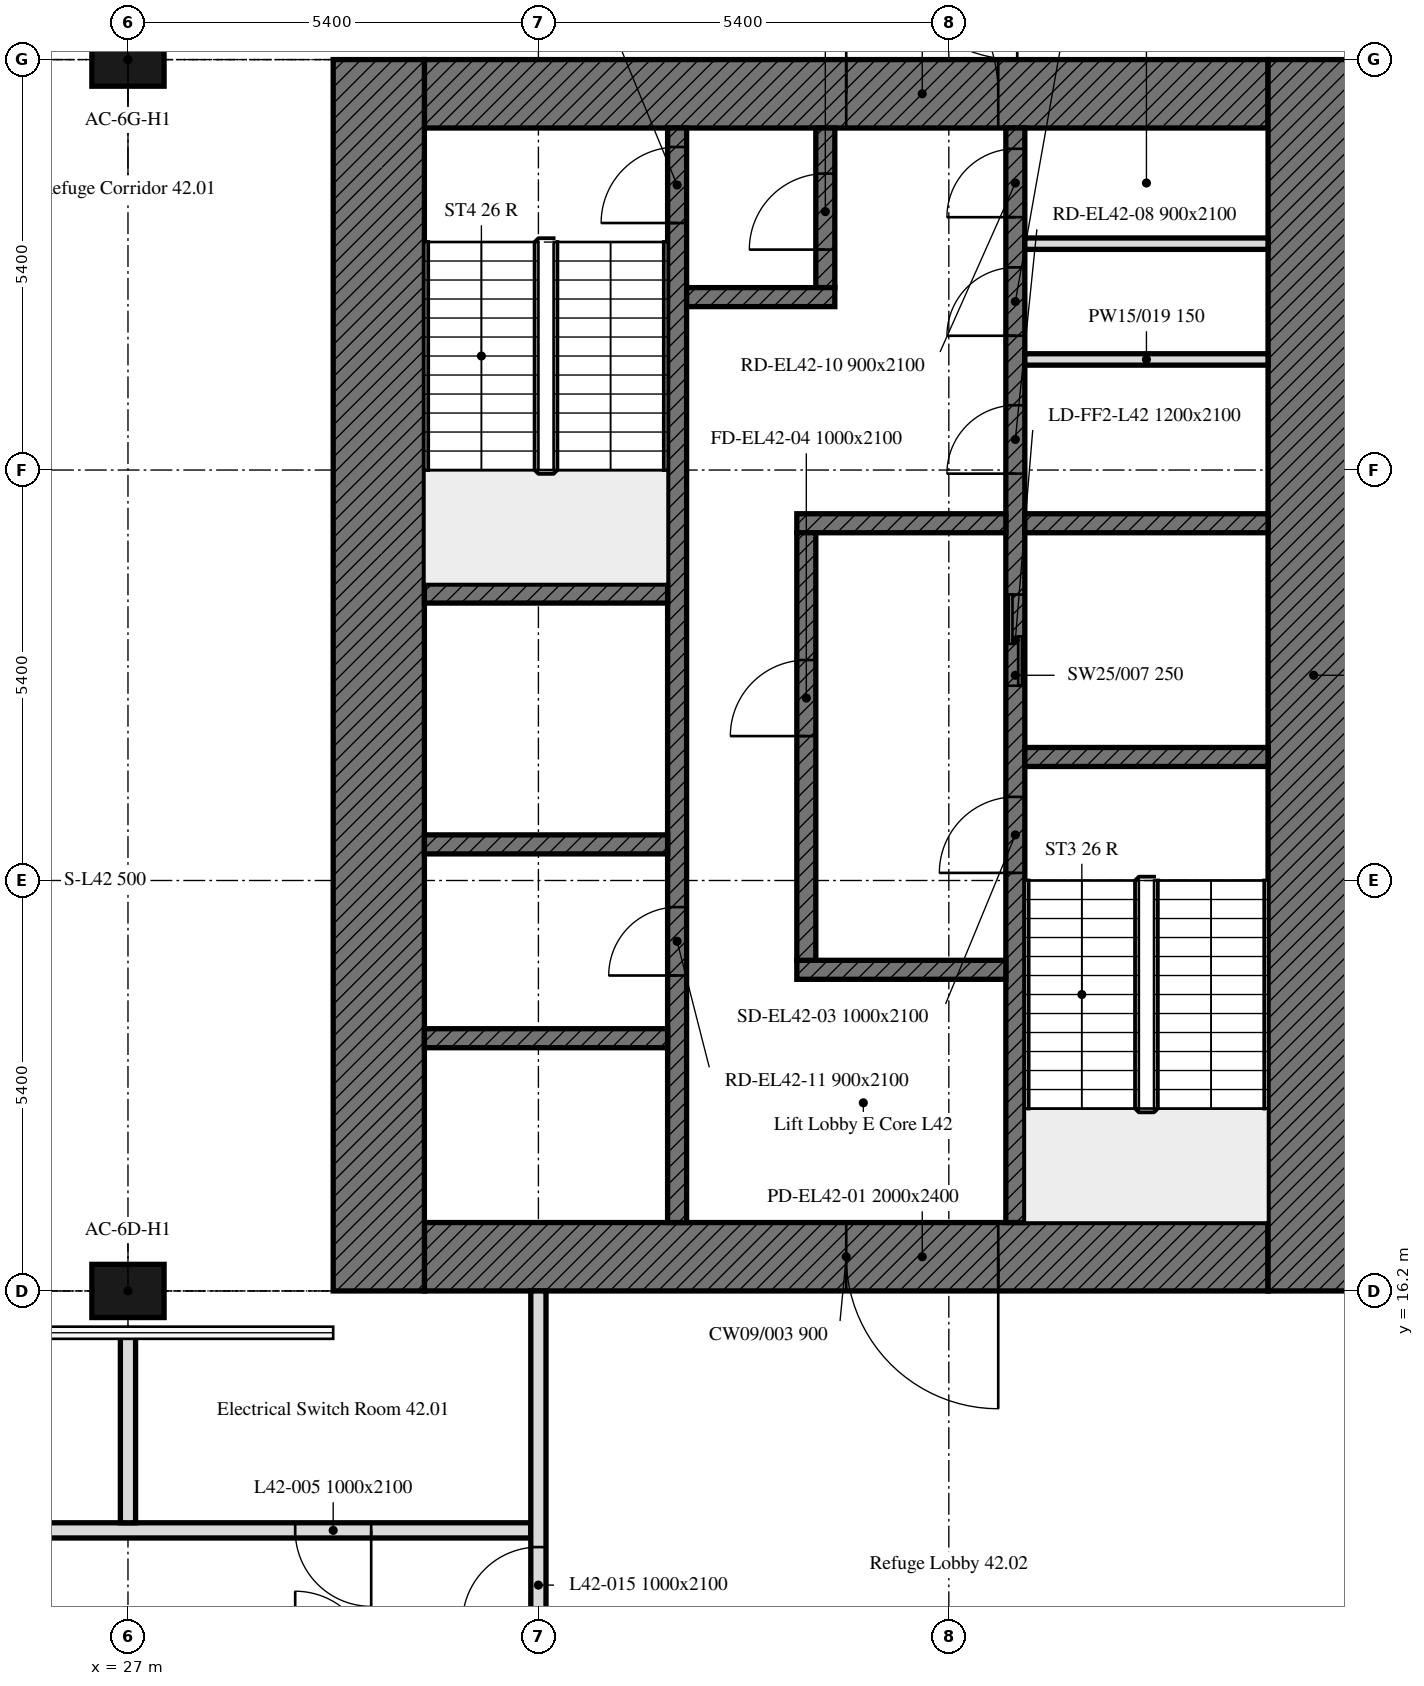
"""IFC4 building model, lengths in metres.
Left out: names, types, materials, properties, quantities, classifications, styles, units other than length and angle.
Written with IfcOpenShell. Run it as: python <this file> out.ifc"""

import sys

from ifc_helpers import new_model, si_unit, direction, frame, frame_2d, origin, origin_2d, place, context, subcontext, project, spatial, rectangle, extrude, element, fill, save


model = new_model("IFC4")
c1 = context("Model", 3, precision=1e-05, world=origin(), true_north=direction((0.0, 1.0)))
c2 = subcontext(c1, "Body", "Model", "MODEL_VIEW")
j1 = project(units=[si_unit("LENGTHUNIT", "METRE"), si_unit("PLANEANGLEUNIT", "RADIAN")], contexts=[c1])
p1 = place(None, origin())
s1 = spatial("IfcSite", under=j1, at=p1, CompositionType="ELEMENT")
p2 = place(p1, origin())
s2 = spatial("IfcBuilding", under=s1, at=p2, CompositionType="ELEMENT")
p3 = place(p2, frame((0.0, 0.0, 175.9)))
s3 = spatial("IfcBuildingStorey", under=s2, at=p3, CompositionType="ELEMENT", Elevation=175.9)
for number, where, z_axis, x_axis in (
    (1, (27.0, 16.2, 0.0), (0.0, 0.0, 1.0), (1.0, 0.0, 0.0)),
    (2, (27.0, 32.4, 0.0), (0.0, 0.0, 1.0), (1.0, 0.0, 0.0)),
):
    element("IfcColumn", number, at=place(p3, frame(where, z_axis=z_axis, x_axis=x_axis)), inside=s3, PredefinedType="COLUMN", context=c2, shape_type="SweptSolid", body=[
        extrude(rectangle(XDim=0.95, YDim=0.7, at=origin_2d()), origin(), (0.0, 0.0, 1.0), 4.5),
    ])
p4 = place(p3, frame((42.0, 16.65, 0.0), z_axis=(0.0, 0.0, 1.0), x_axis=(-1.0, 0.0, 0.0)))
e3 = element("IfcWall", 3, at=p4, inside=s3, PredefinedType="SOLIDWALL", context=c2, shape_type="SweptSolid", body=[
    extrude(rectangle(XDim=11.1, YDim=0.9, at=frame_2d((5.55, 0.0))), origin(), (0.0, 0.0, 1.0), 4.5),
])
p5 = place(p4, frame((3.55, 0.0, 0.0)))
e4 = element("IfcOpeningElement", 4, at=p5, cuts=e3, PredefinedType="OPENING", context=c2, shape_type="SweptSolid", body=[
    extrude(rectangle(XDim=2.0, YDim=2.4, at=frame_2d((1.0, 1.2))), frame((0.0, 0.45, 0.0), z_axis=(0.0, -1.0, 0.0), x_axis=(1.0, 0.0, 0.0)), (0.0, 0.0, 1.0), 0.9),
])
p6 = place(p3, frame((30.9, 31.95, 0.0), z_axis=(0.0, 0.0, 1.0), x_axis=(1.0, 0.0, 0.0)))
e5 = element("IfcWall", 5, at=p6, inside=s3, PredefinedType="SOLIDWALL", context=c2, shape_type="SweptSolid", body=[
    extrude(rectangle(XDim=11.1, YDim=0.9, at=frame_2d((5.55, 0.0))), origin(), (0.0, 0.0, 1.0), 4.5),
])
p7 = place(p6, frame((5.55, 0.0, 0.0)))
e6 = element("IfcOpeningElement", 6, at=p7, cuts=e5, PredefinedType="OPENING", context=c2, shape_type="SweptSolid", body=[
    extrude(rectangle(XDim=2.0, YDim=2.4, at=frame_2d((1.0, 1.2))), frame((0.0, 0.45, 0.0), z_axis=(0.0, -1.0, 0.0), x_axis=(1.0, 0.0, 0.0)), (0.0, 0.0, 1.0), 0.9),
])
for number, where, z_axis, x_axis in (
    (7, (42.6, 32.4, 0.0), (0.0, 0.0, 1.0), (0.0, -1.0, 0.0)),
    (8, (30.3, 16.2, 0.0), (0.0, 0.0, 1.0), (0.0, 1.0, 0.0)),
):
    element("IfcWall", number, at=place(p3, frame(where, z_axis=z_axis, x_axis=x_axis)), inside=s3, PredefinedType="SOLIDWALL", context=c2, shape_type="SweptSolid", body=[
        extrude(rectangle(XDim=16.2, YDim=1.2, at=frame_2d((8.1, 0.0))), origin(), (0.0, 0.0, 1.0), 4.5),
    ])
p8 = place(p3, frame((38.675, 17.1, 0.0), z_axis=(0.0, 0.0, 1.0), x_axis=(0.0, 1.0, 0.0)))
e9 = element("IfcWall", 9, at=p8, inside=s3, PredefinedType="SOLIDWALL", context=c2, shape_type="SweptSolid", body=[
    extrude(rectangle(XDim=14.4, YDim=0.25, at=frame_2d((7.2, 0.0))), origin(), (0.0, 0.0, 1.0), 4.5),
])
p9 = place(p8, frame((4.6, 0.0, 0.0)))
e10 = element("IfcOpeningElement", 10, at=p9, cuts=e9, PredefinedType="OPENING", context=c2, shape_type="SweptSolid", body=[
    extrude(rectangle(XDim=1.0, YDim=2.1, at=frame_2d((0.5, 1.05))), frame((0.0, 0.125, 0.0), z_axis=(0.0, -1.0, 0.0), x_axis=(1.0, 0.0, 0.0)), (0.0, 0.0, 1.0), 0.25),
])
p10 = place(p8, frame((7.062, 0.0, 0.0)))
e11 = element("IfcOpeningElement", 11, at=p10, cuts=e9, PredefinedType="OPENING", context=c2, shape_type="SweptSolid", body=[
    extrude(rectangle(XDim=1.2, YDim=2.1, at=frame_2d((0.6, 1.05))), frame((0.0, 0.125, 0.0), z_axis=(0.0, -1.0, 0.0), x_axis=(1.0, 0.0, 0.0)), (0.0, 0.0, 1.0), 0.25),
])
p11 = place(p8, frame((9.853, 0.0, 0.0)))
e12 = element("IfcOpeningElement", 12, at=p11, cuts=e9, PredefinedType="OPENING", context=c2, shape_type="SweptSolid", body=[
    extrude(rectangle(XDim=0.9, YDim=2.1, at=frame_2d((0.45, 1.05))), frame((0.0, 0.125, 0.0), z_axis=(0.0, -1.0, 0.0), x_axis=(1.0, 0.0, 0.0)), (0.0, 0.0, 1.0), 0.25),
])
p12 = place(p8, frame((11.667, 0.0, 0.0)))
e13 = element("IfcOpeningElement", 13, at=p12, cuts=e9, PredefinedType="OPENING", context=c2, shape_type="SweptSolid", body=[
    extrude(rectangle(XDim=0.9, YDim=2.1, at=frame_2d((0.45, 1.05))), frame((0.0, 0.125, 0.0), z_axis=(0.0, -1.0, 0.0), x_axis=(1.0, 0.0, 0.0)), (0.0, 0.0, 1.0), 0.25),
])
p13 = place(p8, frame((13.227, 0.0, 0.0)))
e14 = element("IfcOpeningElement", 14, at=p13, cuts=e9, PredefinedType="OPENING", context=c2, shape_type="SweptSolid", body=[
    extrude(rectangle(XDim=0.9, YDim=2.1, at=frame_2d((0.45, 1.05))), frame((0.0, 0.125, 0.0), z_axis=(0.0, -1.0, 0.0), x_axis=(1.0, 0.0, 0.0)), (0.0, 0.0, 1.0), 0.25),
])
p14 = place(p3, frame((34.225, 17.1, 0.0), z_axis=(0.0, 0.0, 1.0), x_axis=(0.0, 1.0, 0.0)))
e15 = element("IfcWall", 15, at=p14, inside=s3, PredefinedType="SOLIDWALL", context=c2, shape_type="SweptSolid", body=[
    extrude(rectangle(XDim=14.4, YDim=0.25, at=frame_2d((7.2, 0.0))), origin(), (0.0, 0.0, 1.0), 4.5),
])
p15 = place(p14, frame((13.15, 0.0, 0.0)))
e16 = element("IfcOpeningElement", 16, at=p15, cuts=e15, PredefinedType="OPENING", context=c2, shape_type="SweptSolid", body=[
    extrude(rectangle(XDim=1.0, YDim=2.1, at=frame_2d((0.5, 1.05))), frame((0.0, 0.125, 0.0), z_axis=(0.0, -1.0, 0.0), x_axis=(1.0, 0.0, 0.0)), (0.0, 0.0, 1.0), 0.25),
])
p16 = place(p14, frame((3.25, 0.0, 0.0)))
e17 = element("IfcOpeningElement", 17, at=p16, cuts=e15, PredefinedType="OPENING", context=c2, shape_type="SweptSolid", body=[
    extrude(rectangle(XDim=0.9, YDim=2.1, at=frame_2d((0.45, 1.05))), frame((0.0, 0.125, 0.0), z_axis=(0.0, -1.0, 0.0), x_axis=(1.0, 0.0, 0.0)), (0.0, 0.0, 1.0), 0.25),
])
p17 = place(p3, frame((38.8, 23.225, 0.0), z_axis=(0.0, 0.0, 1.0), x_axis=(1.0, 0.0, 0.0)))
e18 = element("IfcWall", 18, at=p17, inside=s3, PredefinedType="SOLIDWALL", context=c2, shape_type="SweptSolid", body=[
    extrude(rectangle(XDim=3.2, YDim=0.25, at=frame_2d((1.6, 0.0))), origin(), (0.0, 0.0, 1.0), 4.5),
])
for number, where, z_axis, x_axis in (
    (19, (30.9, 25.375, 0.0), (0.0, 0.0, 1.0), (1.0, 0.0, 0.0)),
    (20, (30.9, 22.075, 0.0), (0.0, 0.0, 1.0), (1.0, 0.0, 0.0)),
):
    element("IfcWall", number, at=place(p3, frame(where, z_axis=z_axis, x_axis=x_axis)), inside=s3, PredefinedType="SOLIDWALL", context=c2, shape_type="SweptSolid", body=[
        extrude(rectangle(XDim=3.2, YDim=0.25, at=frame_2d((1.6, 0.0))), origin(), (0.0, 0.0, 1.0), 4.5),
    ])
p18 = place(p3, frame((38.8, 26.3, 0.0), z_axis=(0.0, 0.0, 1.0), x_axis=(1.0, 0.0, 0.0)))
e21 = element("IfcWall", 21, at=p18, inside=s3, PredefinedType="SOLIDWALL", context=c2, shape_type="SweptSolid", body=[
    extrude(rectangle(XDim=3.2, YDim=0.25, at=frame_2d((1.6, 0.0))), origin(), (0.0, 0.0, 1.0), 4.5),
])
for number, where, z_axis, x_axis in (
    (22, (35.8, 26.3, 0.0), (0.0, 0.0, 1.0), (1.0, 0.0, 0.0)),
    (23, (35.8, 20.425, 0.0), (0.0, 0.0, 1.0), (1.0, 0.0, 0.0)),
):
    element("IfcWall", number, at=place(p3, frame(where, z_axis=z_axis, x_axis=x_axis)), inside=s3, PredefinedType="SOLIDWALL", context=c2, shape_type="SweptSolid", body=[
        extrude(rectangle(XDim=2.75, YDim=0.25, at=frame_2d((1.375, 0.0))), origin(), (0.0, 0.0, 1.0), 4.5),
    ])
p19 = place(p3, frame((36.175, 29.4, 0.0), z_axis=(0.0, 0.0, 1.0), x_axis=(0.0, 1.0, 0.0)))
e24 = element("IfcWall", 24, at=p19, inside=s3, PredefinedType="SOLIDWALL", context=c2, shape_type="SweptSolid", body=[
    extrude(rectangle(XDim=2.1, YDim=0.25, at=frame_2d((1.05, 0.0))), origin(), (0.0, 0.0, 1.0), 4.5),
])
p20 = place(p19, frame((0.5, 0.0, 0.0)))
e25 = element("IfcOpeningElement", 25, at=p20, cuts=e24, PredefinedType="OPENING", context=c2, shape_type="SweptSolid", body=[
    extrude(rectangle(XDim=1.0, YDim=2.1, at=frame_2d((0.5, 1.05))), frame((0.0, 0.125, 0.0), z_axis=(0.0, -1.0, 0.0), x_axis=(1.0, 0.0, 0.0)), (0.0, 0.0, 1.0), 0.25),
])
p21 = place(p3, frame((34.35, 29.275, 0.0), z_axis=(0.0, 0.0, 1.0), x_axis=(1.0, 0.0, 0.0)))
e26 = element("IfcWall", 26, at=p21, inside=s3, PredefinedType="SOLIDWALL", context=c2, shape_type="SweptSolid", body=[
    extrude(rectangle(XDim=1.95, YDim=0.25, at=frame_2d((0.975, 0.0))), origin(), (0.0, 0.0, 1.0), 4.5),
])
p22 = place(p3, frame((35.925, 20.55, 0.0), z_axis=(0.0, 0.0, 1.0), x_axis=(0.0, 1.0, 0.0)))
e27 = element("IfcWall", 27, at=p22, inside=s3, PredefinedType="SOLIDWALL", context=c2, shape_type="SweptSolid", body=[
    extrude(rectangle(XDim=5.625, YDim=0.25, at=frame_2d((2.812, 0.0))), origin(), (0.0, 0.0, 1.0), 4.5),
])
p23 = place(p22, frame((2.95, 0.0, 0.0)))
e28 = element("IfcOpeningElement", 28, at=p23, cuts=e27, PredefinedType="OPENING", context=c2, shape_type="SweptSolid", body=[
    extrude(rectangle(XDim=1.0, YDim=2.1, at=frame_2d((0.5, 1.05))), frame((0.0, 0.125, 0.0), z_axis=(0.0, -1.0, 0.0), x_axis=(1.0, 0.0, 0.0)), (0.0, 0.0, 1.0), 0.25),
])
p24 = place(p3, frame((30.9, 19.525, 0.0), z_axis=(0.0, 0.0, 1.0), x_axis=(1.0, 0.0, 0.0)))
e29 = element("IfcWall", 29, at=p24, inside=s3, PredefinedType="SOLIDWALL", context=c2, shape_type="SweptSolid", body=[
    extrude(rectangle(XDim=3.2, YDim=0.25, at=frame_2d((1.6, 0.0))), origin(), (0.0, 0.0, 1.0), 4.5),
])
for number, where, z_axis, x_axis in (
    (30, (38.8, 28.455, 0.0), (0.0, 0.0, 1.0), (1.0, 0.0, 0.0)),
    (31, (38.8, 29.978, 0.0), (0.0, 0.0, 1.0), (1.0, 0.0, 0.0)),
):
    element("IfcWall", number, at=place(p3, frame(where, z_axis=z_axis, x_axis=x_axis)), inside=s3, PredefinedType="PARTITIONING", context=c2, shape_type="SweptSolid", body=[
        extrude(rectangle(XDim=3.2, YDim=0.15, at=frame_2d((1.6, 0.0))), origin(), (0.0, 0.0, 1.0), 4.5),
    ])
p25 = place(p3, frame((32.3, 13.05, 0.0), z_axis=(0.0, 0.0, 1.0), x_axis=(-1.0, 0.0, 0.0)))
e32 = element("IfcWall", 32, at=p25, inside=s3, PredefinedType="PARTITIONING", context=c2, shape_type="SweptSolid", body=[
    extrude(rectangle(XDim=16.0, YDim=0.2, at=frame_2d((8.0, 0.0))), origin(), (0.0, 0.0, 1.0), 3.9),
])
p26 = place(p25, frame((12.9, 0.0, 0.0)))
e33 = element("IfcOpeningElement", 33, at=p26, cuts=e32, PredefinedType="OPENING", context=c2, shape_type="SweptSolid", body=[
    extrude(rectangle(XDim=1.0, YDim=2.1, at=frame_2d((0.5, 1.05))), frame((0.0, 0.1, 0.0), z_axis=(0.0, -1.0, 0.0), x_axis=(1.0, 0.0, 0.0)), (0.0, 0.0, 1.0), 0.2),
])
p27 = place(p25, frame((7.5, 0.0, 0.0)))
e34 = element("IfcOpeningElement", 34, at=p27, cuts=e32, PredefinedType="OPENING", context=c2, shape_type="SweptSolid", body=[
    extrude(rectangle(XDim=1.0, YDim=2.1, at=frame_2d((0.5, 1.05))), frame((0.0, 0.1, 0.0), z_axis=(0.0, -1.0, 0.0), x_axis=(1.0, 0.0, 0.0)), (0.0, 0.0, 1.0), 0.2),
])
p28 = place(p25, frame((2.1, 0.0, 0.0)))
e35 = element("IfcOpeningElement", 35, at=p28, cuts=e32, PredefinedType="OPENING", context=c2, shape_type="SweptSolid", body=[
    extrude(rectangle(XDim=1.0, YDim=2.1, at=frame_2d((0.5, 1.05))), frame((0.0, 0.1, 0.0), z_axis=(0.0, -1.0, 0.0), x_axis=(1.0, 0.0, 0.0)), (0.0, 0.0, 1.0), 0.2),
])
p29 = place(p3, frame((32.4, 11.326, 0.0), z_axis=(0.0, 0.0, 1.0), x_axis=(0.0, 1.0, 0.0)))
e36 = element("IfcWall", 36, at=p29, inside=s3, PredefinedType="PARTITIONING", context=c2, shape_type="SweptSolid", body=[
    extrude(rectangle(XDim=4.874, YDim=0.2, at=frame_2d((2.437, 0.0))), origin(), (0.0, 0.0, 1.0), 3.9),
])
p30 = place(p29, frame((0.504, 0.0, 0.0)))
e37 = element("IfcOpeningElement", 37, at=p30, cuts=e36, PredefinedType="OPENING", context=c2, shape_type="SweptSolid", body=[
    extrude(rectangle(XDim=1.0, YDim=2.1, at=frame_2d((0.5, 1.05))), frame((0.0, 0.1, 0.0), z_axis=(0.0, -1.0, 0.0), x_axis=(1.0, 0.0, 0.0)), (0.0, 0.0, 1.0), 0.2),
])
p31 = place(p3, frame((27.0, 13.15, 0.0), z_axis=(0.0, 0.0, 1.0), x_axis=(0.0, 1.0, 0.0)))
e38 = element("IfcWall", 38, at=p31, inside=s3, PredefinedType="PARTITIONING", context=c2, shape_type="SweptSolid", body=[
    extrude(rectangle(XDim=2.555, YDim=0.2, at=frame_2d((1.278, 0.0))), origin(), (0.0, 0.0, 1.0), 3.9),
])
p32 = place(p5, origin())
e39 = element("IfcDoor", 39, at=p32, inside=s3, OperationType="DOUBLE_DOOR_SINGLE_SWING", PredefinedType="DOOR", context=c2, shape_type="SweptSolid", body=[
    extrude(rectangle(XDim=2.0, YDim=2.4, at=frame_2d((1.0, 1.2))), frame((0.0, 0.025, 0.0), z_axis=(0.0, -1.0, 0.0), x_axis=(1.0, 0.0, 0.0)), (0.0, 0.0, 1.0), 0.05),
])
fill(e4, e39)
p33 = place(p7, origin())
e40 = element("IfcDoor", 40, at=p33, inside=s3, OperationType="DOUBLE_DOOR_SINGLE_SWING", PredefinedType="DOOR", context=c2, shape_type="SweptSolid", body=[
    extrude(rectangle(XDim=2.0, YDim=2.4, at=frame_2d((1.0, 1.2))), frame((0.0, 0.025, 0.0), z_axis=(0.0, -1.0, 0.0), x_axis=(1.0, 0.0, 0.0)), (0.0, 0.0, 1.0), 0.05),
])
fill(e6, e40)
p34 = place(p9, origin())
e41 = element("IfcDoor", 41, at=p34, inside=s3, OperationType="SINGLE_SWING_LEFT", PredefinedType="DOOR", context=c2, shape_type="SweptSolid", body=[
    extrude(rectangle(XDim=1.0, YDim=2.1, at=frame_2d((0.5, 1.05))), frame((0.0, 0.025, 0.0), z_axis=(0.0, -1.0, 0.0), x_axis=(1.0, 0.0, 0.0)), (0.0, 0.0, 1.0), 0.05),
])
fill(e10, e41)
p35 = place(p23, origin())
e42 = element("IfcDoor", 42, at=p35, inside=s3, OperationType="SINGLE_SWING_LEFT", PredefinedType="DOOR", context=c2, shape_type="SweptSolid", body=[
    extrude(rectangle(XDim=1.0, YDim=2.1, at=frame_2d((0.5, 1.05))), frame((0.0, 0.025, 0.0), z_axis=(0.0, -1.0, 0.0), x_axis=(1.0, 0.0, 0.0)), (0.0, 0.0, 1.0), 0.05),
])
fill(e28, e42)
p36 = place(p15, origin())
e43 = element("IfcDoor", 43, at=p36, inside=s3, OperationType="SINGLE_SWING_LEFT", PredefinedType="DOOR", context=c2, shape_type="SweptSolid", body=[
    extrude(rectangle(XDim=1.0, YDim=2.1, at=frame_2d((0.5, 1.05))), frame((0.0, 0.025, 0.0), z_axis=(0.0, -1.0, 0.0), x_axis=(1.0, 0.0, 0.0)), (0.0, 0.0, 1.0), 0.05),
])
fill(e16, e43)
p37 = place(p20, origin())
e44 = element("IfcDoor", 44, at=p37, inside=s3, OperationType="SINGLE_SWING_LEFT", PredefinedType="DOOR", context=c2, shape_type="SweptSolid", body=[
    extrude(rectangle(XDim=1.0, YDim=2.1, at=frame_2d((0.5, 1.05))), frame((0.0, 0.025, 0.0), z_axis=(0.0, -1.0, 0.0), x_axis=(1.0, 0.0, 0.0)), (0.0, 0.0, 1.0), 0.05),
])
fill(e25, e44)
p38 = place(p10, origin())
e45 = element("IfcDoor", 45, at=p38, inside=s3, OperationType="DOUBLE_DOOR_SLIDING", PredefinedType="DOOR", context=c2, shape_type="SweptSolid", body=[
    extrude(rectangle(XDim=1.2, YDim=2.1, at=frame_2d((0.6, 1.05))), frame((0.0, 0.025, 0.0), z_axis=(0.0, -1.0, 0.0), x_axis=(1.0, 0.0, 0.0)), (0.0, 0.0, 1.0), 0.05),
])
fill(e11, e45)
p39 = place(p11, origin())
e46 = element("IfcDoor", 46, at=p39, inside=s3, OperationType="SINGLE_SWING_LEFT", PredefinedType="DOOR", context=c2, shape_type="SweptSolid", body=[
    extrude(rectangle(XDim=0.9, YDim=2.1, at=frame_2d((0.45, 1.05))), frame((0.0, 0.025, 0.0), z_axis=(0.0, -1.0, 0.0), x_axis=(1.0, 0.0, 0.0)), (0.0, 0.0, 1.0), 0.05),
])
fill(e12, e46)
p40 = place(p12, origin())
e47 = element("IfcDoor", 47, at=p40, inside=s3, OperationType="SINGLE_SWING_LEFT", PredefinedType="DOOR", context=c2, shape_type="SweptSolid", body=[
    extrude(rectangle(XDim=0.9, YDim=2.1, at=frame_2d((0.45, 1.05))), frame((0.0, 0.025, 0.0), z_axis=(0.0, -1.0, 0.0), x_axis=(1.0, 0.0, 0.0)), (0.0, 0.0, 1.0), 0.05),
])
fill(e13, e47)
p41 = place(p13, origin())
e48 = element("IfcDoor", 48, at=p41, inside=s3, OperationType="SINGLE_SWING_LEFT", PredefinedType="DOOR", context=c2, shape_type="SweptSolid", body=[
    extrude(rectangle(XDim=0.9, YDim=2.1, at=frame_2d((0.45, 1.05))), frame((0.0, 0.025, 0.0), z_axis=(0.0, -1.0, 0.0), x_axis=(1.0, 0.0, 0.0)), (0.0, 0.0, 1.0), 0.05),
])
fill(e14, e48)
p42 = place(p16, origin())
e49 = element("IfcDoor", 49, at=p42, inside=s3, OperationType="SINGLE_SWING_LEFT", PredefinedType="DOOR", context=c2, shape_type="SweptSolid", body=[
    extrude(rectangle(XDim=0.9, YDim=2.1, at=frame_2d((0.45, 1.05))), frame((0.0, 0.025, 0.0), z_axis=(0.0, -1.0, 0.0), x_axis=(1.0, 0.0, 0.0)), (0.0, 0.0, 1.0), 0.05),
])
fill(e17, e49)
p43 = place(p28, origin())
e50 = element("IfcDoor", 50, at=p43, inside=s3, OperationType="SINGLE_SWING_LEFT", PredefinedType="DOOR", context=c2, shape_type="SweptSolid", body=[
    extrude(rectangle(XDim=1.0, YDim=2.1, at=frame_2d((0.5, 1.05))), frame((0.0, 0.025, 0.0), z_axis=(0.0, -1.0, 0.0), x_axis=(1.0, 0.0, 0.0)), (0.0, 0.0, 1.0), 0.05),
])
fill(e35, e50)
p44 = place(p30, origin())
e51 = element("IfcDoor", 51, at=p44, inside=s3, OperationType="SINGLE_SWING_RIGHT", PredefinedType="DOOR", context=c2, shape_type="SweptSolid", body=[
    extrude(rectangle(XDim=1.0, YDim=2.1, at=frame_2d((0.5, 1.05))), frame((0.0, 0.025, 0.0), z_axis=(0.0, -1.0, 0.0), x_axis=(1.0, 0.0, 0.0)), (0.0, 0.0, 1.0), 0.05),
])
fill(e37, e51)
save(model, sys.argv[1])
